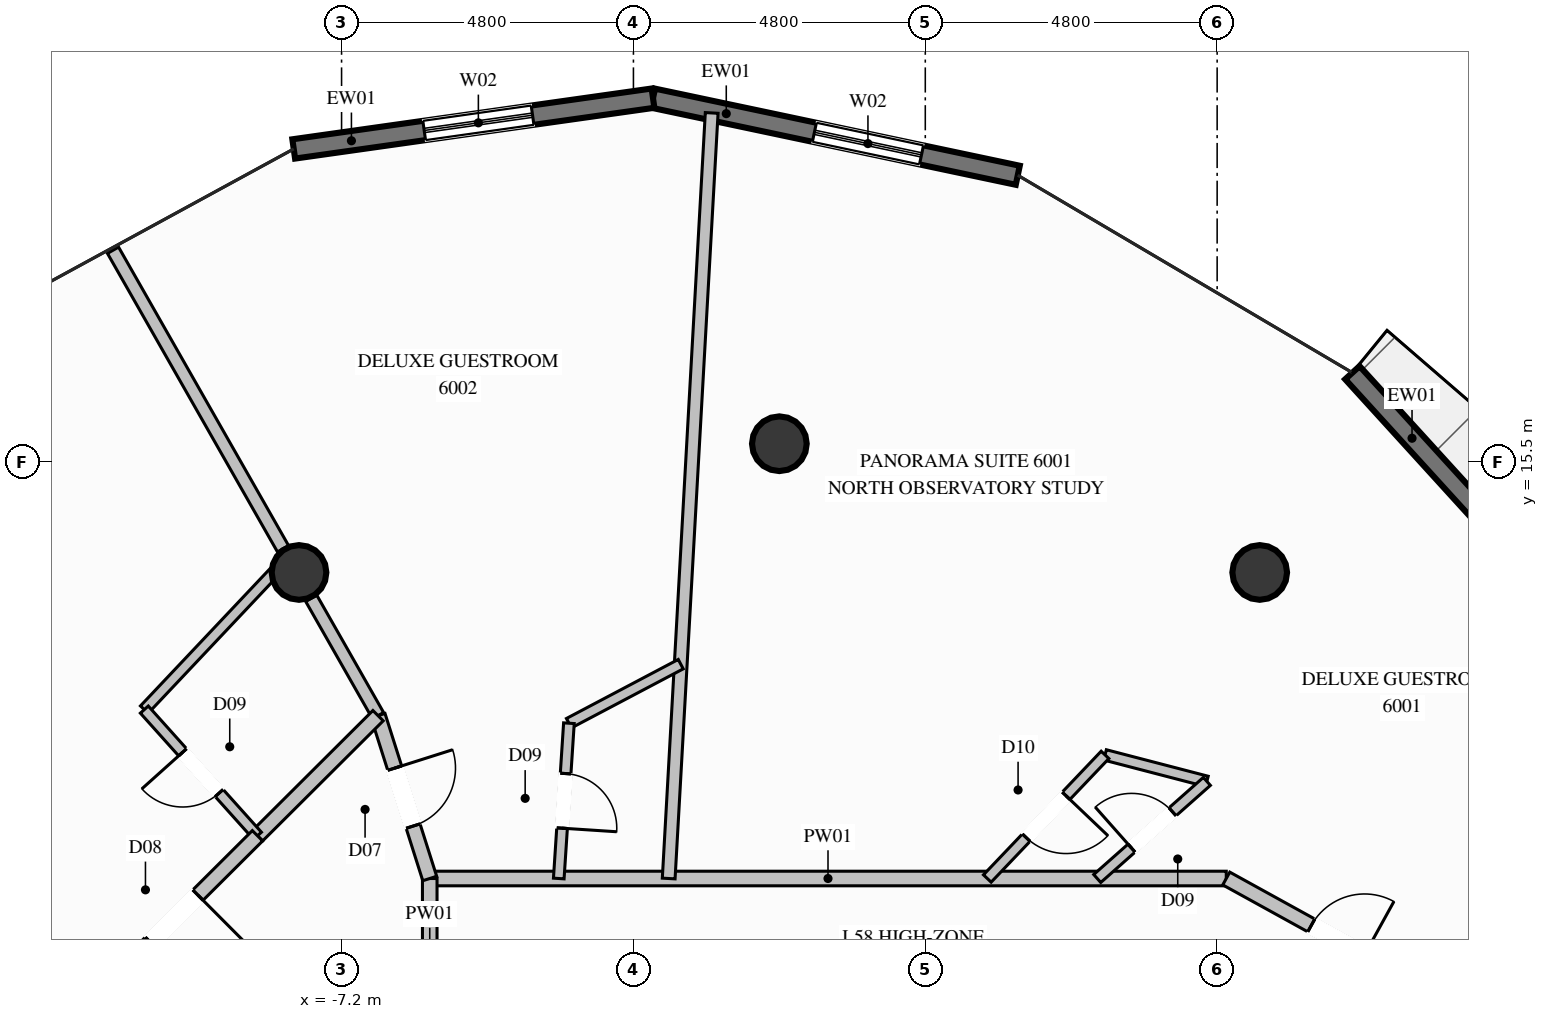
"""IFC4 building model, lengths in metres.
Left out: names, types, materials, properties, quantities, classifications, styles, units other than length and angle.
Written with IfcOpenShell. Run it as: python <this file> out.ifc"""

import sys

from ifc_helpers import new_model, si_unit, direction, frame, frame_2d, origin, origin_2d, place, context, subcontext, project, spatial, rectangle, circle, extrude, element, fill, save


model = new_model("IFC4")
c1 = context("Model", 3, precision=1e-05, world=origin(), true_north=direction((0.0, 1.0)))
c2 = subcontext(c1, "Body", "Model", "MODEL_VIEW")
j1 = project(units=[si_unit("LENGTHUNIT", "METRE"), si_unit("PLANEANGLEUNIT", "RADIAN")], contexts=[c1])
p1 = place(None, origin())
s1 = spatial("IfcSite", under=j1, at=p1, CompositionType="ELEMENT")
p2 = place(p1, origin())
s2 = spatial("IfcBuilding", under=s1, at=p2, CompositionType="ELEMENT")
p3 = place(p2, frame((0.0, 0.0, 223.6)))
s3 = spatial("IfcBuildingStorey", under=s2, at=p3, CompositionType="ELEMENT", Elevation=223.6)
for number, where, z_axis, x_axis in (
    (1, (7.9, 13.683, 0.0), (0.0, 0.0, 1.0), (1.0, 0.0, 0.0)),
    (2, (0.0, 15.8, 0.0), (0.0, 0.0, 1.0), (1.0, 0.0, 0.0)),
    (3, (-7.9, 13.683, 0.0), (0.0, 0.0, 1.0), (1.0, 0.0, 0.0)),
):
    element("IfcColumn", number, at=place(p3, frame(where, z_axis=z_axis, x_axis=x_axis)), inside=s3, PredefinedType="COLUMN", context=c2, shape_type="SweptSolid", body=[
        extrude(circle(Radius=0.45, at=origin_2d()), origin(), (0.0, 0.0, 1.0), 3.6),
    ])
p4 = place(p3, frame((9.424, 16.968, 0.0), z_axis=(0.0, 0.0, 1.0), x_axis=(0.673187110457, -0.739472186302, 0.0)))
e4 = element("IfcWall", 4, at=p4, inside=s3, PredefinedType="SOLIDWALL", context=c2, shape_type="SweptSolid", body=[
    extrude(rectangle(XDim=6.637, YDim=0.32, at=frame_2d((3.319, 0.0))), origin(), (0.0, 0.0, 1.0), 3.36),
])
p5 = place(p4, frame((3.165, 0.0, 0.35)))
e5 = element("IfcOpeningElement", 5, at=p5, cuts=e4, PredefinedType="OPENING", context=c2, shape_type="SweptSolid", body=[
    extrude(rectangle(XDim=1.8, YDim=2.6, at=frame_2d((0.9, 1.3))), frame((0.0, 0.17, 0.0), z_axis=(0.0, -1.0, 0.0), x_axis=(1.0, 0.0, 0.0)), (0.0, 0.0, 1.0), 0.34),
])
p6 = place(p3, frame((-2.078, 21.483, 0.0), z_axis=(0.0, 0.0, 1.0), x_axis=(0.978387673067, -0.206779015353, 0.0)))
e6 = element("IfcWall", 6, at=p6, inside=s3, PredefinedType="SOLIDWALL", context=c2, shape_type="SweptSolid", body=[
    extrude(rectangle(XDim=6.131, YDim=0.32, at=frame_2d((3.066, 0.0))), origin(), (0.0, 0.0, 1.0), 3.36),
])
p7 = place(p6, frame((2.713, 0.0, 0.35)))
e7 = element("IfcOpeningElement", 7, at=p7, cuts=e6, PredefinedType="OPENING", context=c2, shape_type="SweptSolid", body=[
    extrude(rectangle(XDim=1.8, YDim=2.6, at=frame_2d((0.9, 1.3))), frame((0.0, 0.17, 0.0), z_axis=(0.0, -1.0, 0.0), x_axis=(1.0, 0.0, 0.0)), (0.0, 0.0, 1.0), 0.34),
])
p8 = place(p3, frame((-7.987, 20.648, 0.0), z_axis=(0.0, 0.0, 1.0), x_axis=(0.990164339135, 0.13990919021, 0.0)))
e8 = element("IfcWall", 8, at=p8, inside=s3, PredefinedType="SOLIDWALL", context=c2, shape_type="SweptSolid", body=[
    extrude(rectangle(XDim=5.968, YDim=0.32, at=frame_2d((2.984, 0.0))), origin(), (0.0, 0.0, 1.0), 3.36),
])
p9 = place(p8, frame((2.167, 0.0, 0.35)))
e9 = element("IfcOpeningElement", 9, at=p9, cuts=e8, PredefinedType="OPENING", context=c2, shape_type="SweptSolid", body=[
    extrude(rectangle(XDim=1.8, YDim=2.6, at=frame_2d((0.9, 1.3))), frame((0.0, 0.17, 0.0), z_axis=(0.0, -1.0, 0.0), x_axis=(1.0, 0.0, 0.0)), (0.0, 0.0, 1.0), 0.34),
])
p10 = place(p3, frame((-5.75, 8.65, 0.0), z_axis=(0.0, 0.0, 1.0), x_axis=(1.0, 0.0, 0.0)))
e10 = element("IfcWall", 10, at=p10, inside=s3, PredefinedType="PARTITIONING", context=c2, shape_type="SweptSolid", body=[
    extrude(rectangle(XDim=13.1, YDim=0.24, at=frame_2d((6.55, 0.0))), origin(), (0.0, 0.0, 1.0), 3.36),
])
p11 = place(p3, frame((-5.75, 6.1, 0.0), z_axis=(0.0, 0.0, 1.0), x_axis=(0.0, 1.0, 0.0)))
e11 = element("IfcWall", 11, at=p11, inside=s3, PredefinedType="PARTITIONING", context=c2, shape_type="SweptSolid", body=[
    extrude(rectangle(XDim=2.55, YDim=0.24, at=frame_2d((1.275, 0.0))), origin(), (0.0, 0.0, 1.0), 3.36),
])
p12 = place(p3, frame((11.022, 6.625, 0.0), z_axis=(0.0, 0.0, 1.0), x_axis=(0.88806021567, 0.459727150975, 0.0)))
e12 = element("IfcWall", 12, at=p12, inside=s3, PredefinedType="PARTITIONING", context=c2, shape_type="SweptSolid", body=[
    extrude(rectangle(XDim=2.489, YDim=0.21, at=frame_2d((1.244, 0.0))), origin(), (0.0, 0.0, 1.0), 2.801),
])
p13 = place(p3, frame((-6.6, 11.328, 0.0), z_axis=(0.0, 0.0, 1.0), x_axis=(-0.494753305644, 0.869033466878, 0.0)))
e13 = element("IfcWall", 13, at=p13, inside=s3, PredefinedType="PARTITIONING", context=c2, shape_type="SweptSolid", body=[
    extrude(rectangle(XDim=2.221, YDim=0.21, at=frame_2d((1.11, 0.0))), origin(), (0.0, 0.0, 1.0), 2.801),
])
p14 = place(p3, frame((-8.163, 14.073, 0.0), z_axis=(0.0, 0.0, 1.0), x_axis=(-0.494909777101, 0.868944366763, 0.0)))
e14 = element("IfcWall", 14, at=p14, inside=s3, PredefinedType="PARTITIONING", context=c2, shape_type="SweptSolid", body=[
    extrude(rectangle(XDim=5.649, YDim=0.21, at=frame_2d((2.825, 0.0))), origin(), (0.0, 0.0, 1.0), 3.36),
])
p15 = place(p3, frame((5.356, 10.683, 0.0), z_axis=(0.0, 0.0, 1.0), x_axis=(0.967748954233, -0.25191657663, 0.0)))
e15 = element("IfcWall", 15, at=p15, inside=s3, PredefinedType="PLUMBINGWALL", context=c2, shape_type="SweptSolid", body=[
    extrude(rectangle(XDim=1.731, YDim=0.175, at=frame_2d((0.865, 0.0))), origin(), (0.0, 0.0, 1.0), 3.36),
])
p16 = place(p3, frame((5.356, 10.683, 0.0), z_axis=(0.0, 0.0, 1.0), x_axis=(-0.689590027436, -0.724199968283, 0.0)))
e16 = element("IfcWall", 16, at=p16, inside=s3, PredefinedType="PLUMBINGWALL", context=c2, shape_type="SweptSolid", body=[
    extrude(rectangle(XDim=2.808, YDim=0.175, at=frame_2d((1.404, 0.0))), origin(), (0.0, 0.0, 1.0), 3.36),
])
p17 = place(p16, frame((0.929, 0.0, 0.0)))
e17 = element("IfcOpeningElement", 17, at=p17, cuts=e16, PredefinedType="OPENING", context=c2, shape_type="SweptSolid", body=[
    extrude(rectangle(XDim=0.95, YDim=2.1, at=frame_2d((0.475, 1.05))), frame((0.0, 0.098, 0.0), z_axis=(0.0, -1.0, 0.0), x_axis=(1.0, 0.0, 0.0)), (0.0, 0.0, 1.0), 0.195),
])
p18 = place(p3, frame((5.228, 8.65, 0.0), z_axis=(0.0, 0.0, 1.0), x_axis=(0.748537869346, 0.663092043502, 0.0)))
e18 = element("IfcWall", 18, at=p18, inside=s3, PredefinedType="PLUMBINGWALL", context=c2, shape_type="SweptSolid", body=[
    extrude(rectangle(XDim=2.409, YDim=0.175, at=frame_2d((1.204, 0.0))), origin(), (0.0, 0.0, 1.0), 3.36),
])
p19 = place(p18, frame((0.754, 0.0, 0.0)))
e19 = element("IfcOpeningElement", 19, at=p19, cuts=e18, PredefinedType="OPENING", context=c2, shape_type="SweptSolid", body=[
    extrude(rectangle(XDim=0.9, YDim=2.1, at=frame_2d((0.45, 1.05))), frame((0.0, 0.098, 0.0), z_axis=(0.0, -1.0, 0.0), x_axis=(1.0, 0.0, 0.0)), (0.0, 0.0, 1.0), 0.195),
])
p20 = place(p3, frame((7.35, 8.65, 0.0), z_axis=(0.0, 0.0, 1.0), x_axis=(0.875674474849, -0.482901867979, 0.0)))
e20 = element("IfcWall", 20, at=p20, inside=s3, PredefinedType="PARTITIONING", context=c2, shape_type="SweptSolid", body=[
    extrude(rectangle(XDim=4.193, YDim=0.24, at=frame_2d((2.097, 0.0))), origin(), (0.0, 0.0, 1.0), 3.36),
])
p21 = place(p20, frame((1.597, 0.0, 0.0)))
e21 = element("IfcOpeningElement", 21, at=p21, cuts=e20, PredefinedType="OPENING", context=c2, shape_type="SweptSolid", body=[
    extrude(rectangle(XDim=1.0, YDim=2.2, at=frame_2d((0.5, 1.1))), frame((0.0, 0.13, 0.0), z_axis=(0.0, -1.0, 0.0), x_axis=(1.0, 0.0, 0.0)), (0.0, 0.0, 1.0), 0.26),
])
p22 = place(p3, frame((-1.82, 8.65, 0.0), z_axis=(0.0, 0.0, 1.0), x_axis=(0.056069425864, 0.998426872376, 0.0)))
e22 = element("IfcWall", 22, at=p22, inside=s3, PredefinedType="PARTITIONING", context=c2, shape_type="SweptSolid", body=[
    extrude(rectangle(XDim=12.61, YDim=0.21, at=frame_2d((6.305, 0.0))), origin(), (0.0, 0.0, 1.0), 3.36),
])
p23 = place(p3, frame((-3.461, 11.204, 0.0), z_axis=(0.0, 0.0, 1.0), x_axis=(0.884298578972, 0.466921859874, 0.0)))
e23 = element("IfcWall", 23, at=p23, inside=s3, PredefinedType="PLUMBINGWALL", context=c2, shape_type="SweptSolid", body=[
    extrude(rectangle(XDim=2.079, YDim=0.175, at=frame_2d((1.04, 0.0))), origin(), (0.0, 0.0, 1.0), 3.36),
])
p24 = place(p3, frame((-3.461, 11.204, 0.0), z_axis=(0.0, 0.0, 1.0), x_axis=(-0.065240183473, -0.997869589907, 0.0)))
e24 = element("IfcWall", 24, at=p24, inside=s3, PredefinedType="PLUMBINGWALL", context=c2, shape_type="SweptSolid", body=[
    extrude(rectangle(XDim=2.56, YDim=0.175, at=frame_2d((1.28, 0.0))), origin(), (0.0, 0.0, 1.0), 3.36),
])
p25 = place(p24, frame((0.83, 0.0, 0.0)))
e25 = element("IfcOpeningElement", 25, at=p25, cuts=e24, PredefinedType="OPENING", context=c2, shape_type="SweptSolid", body=[
    extrude(rectangle(XDim=0.9, YDim=2.1, at=frame_2d((0.45, 1.05))), frame((0.0, 0.098, 0.0), z_axis=(0.0, -1.0, 0.0), x_axis=(1.0, 0.0, 0.0)), (0.0, 0.0, 1.0), 0.195),
])
p26 = place(p3, frame((-6.6, 11.328, 0.0), z_axis=(0.0, 0.0, 1.0), x_axis=(0.30256159068, -0.953129835775, 0.0)))
e26 = element("IfcWall", 26, at=p26, inside=s3, PredefinedType="PARTITIONING", context=c2, shape_type="SweptSolid", body=[
    extrude(rectangle(XDim=2.81, YDim=0.24, at=frame_2d((1.405, 0.0))), origin(), (0.0, 0.0, 1.0), 3.36),
])
p27 = place(p26, frame((0.905, 0.0, 0.0)))
e27 = element("IfcOpeningElement", 27, at=p27, cuts=e26, PredefinedType="OPENING", context=c2, shape_type="SweptSolid", body=[
    extrude(rectangle(XDim=1.0, YDim=2.2, at=frame_2d((0.5, 1.1))), frame((0.0, 0.13, 0.0), z_axis=(0.0, -1.0, 0.0), x_axis=(1.0, 0.0, 0.0)), (0.0, 0.0, 1.0), 0.26),
])
p28 = place(p3, frame((-6.6, 11.328, 0.0), z_axis=(0.0, 0.0, 1.0), x_axis=(-0.708544738437, -0.705665893772, 0.0)))
e28 = element("IfcWall", 28, at=p28, inside=s3, PredefinedType="PARTITIONING", context=c2, shape_type="SweptSolid", body=[
    extrude(rectangle(XDim=2.799, YDim=0.24, at=frame_2d((1.399, 0.0))), origin(), (0.0, 0.0, 1.0), 3.36),
])
p29 = place(p3, frame((-8.082, 13.93, 0.0), z_axis=(0.0, 0.0, 1.0), x_axis=(-0.686486009921, -0.727143010819, 0.0)))
e29 = element("IfcWall", 29, at=p29, inside=s3, PredefinedType="PLUMBINGWALL", context=c2, shape_type="SweptSolid", body=[
    extrude(rectangle(XDim=3.441, YDim=0.175, at=frame_2d((1.72, 0.0))), origin(), (0.0, 0.0, 1.0), 2.929),
])
p30 = place(p3, frame((-8.583, 9.353, 0.0), z_axis=(0.0, 0.0, 1.0), x_axis=(-0.667700723626, 0.74442981111, 0.0)))
e30 = element("IfcWall", 30, at=p30, inside=s3, PredefinedType="PLUMBINGWALL", context=c2, shape_type="SweptSolid", body=[
    extrude(rectangle(XDim=2.787, YDim=0.175, at=frame_2d((1.394, 0.0))), origin(), (0.0, 0.0, 1.0), 3.36),
])
p31 = place(p30, frame((0.944, 0.0, 0.0)))
e31 = element("IfcOpeningElement", 31, at=p31, cuts=e30, PredefinedType="OPENING", context=c2, shape_type="SweptSolid", body=[
    extrude(rectangle(XDim=0.9, YDim=2.1, at=frame_2d((0.45, 1.05))), frame((0.0, 0.098, 0.0), z_axis=(0.0, -1.0, 0.0), x_axis=(1.0, 0.0, 0.0)), (0.0, 0.0, 1.0), 0.195),
])
p32 = place(p3, frame((-8.583, 9.353, 0.0), z_axis=(0.0, 0.0, 1.0), x_axis=(-0.70852632163, -0.70568438523, 0.0)))
e32 = element("IfcWall", 32, at=p32, inside=s3, PredefinedType="PARTITIONING", context=c2, shape_type="SweptSolid", body=[
    extrude(rectangle(XDim=3.866, YDim=0.24, at=frame_2d((1.933, 0.0))), origin(), (0.0, 0.0, 1.0), 3.36),
])
p33 = place(p32, frame((1.383, 0.0, 0.0)))
e33 = element("IfcOpeningElement", 33, at=p33, cuts=e32, PredefinedType="OPENING", context=c2, shape_type="SweptSolid", body=[
    extrude(rectangle(XDim=1.1, YDim=2.3, at=frame_2d((0.55, 1.15))), frame((0.0, 0.13, 0.0), z_axis=(0.0, -1.0, 0.0), x_axis=(1.0, 0.0, 0.0)), (0.0, 0.0, 1.0), 0.26),
])
p34 = place(p7, origin())
e34 = element("IfcWindow", 34, at=p34, inside=s3, PartitioningType="SINGLE_PANEL", PredefinedType="WINDOW", context=c2, shape_type="SweptSolid", body=[
    extrude(rectangle(XDim=1.8, YDim=2.6, at=frame_2d((0.9, 1.3))), frame((0.0, 0.03, 0.0), z_axis=(0.0, -1.0, 0.0), x_axis=(1.0, 0.0, 0.0)), (0.0, 0.0, 1.0), 0.06),
])
fill(e7, e34)
p35 = place(p9, origin())
e35 = element("IfcWindow", 35, at=p35, inside=s3, PartitioningType="SINGLE_PANEL", PredefinedType="WINDOW", context=c2, shape_type="SweptSolid", body=[
    extrude(rectangle(XDim=1.8, YDim=2.6, at=frame_2d((0.9, 1.3))), frame((0.0, 0.03, 0.0), z_axis=(0.0, -1.0, 0.0), x_axis=(1.0, 0.0, 0.0)), (0.0, 0.0, 1.0), 0.06),
])
fill(e9, e35)
p36 = place(p19, origin())
e36 = element("IfcDoor", 36, at=p36, inside=s3, OperationType="SINGLE_SWING_LEFT", PredefinedType="DOOR", context=c2, shape_type="SweptSolid", body=[
    extrude(rectangle(XDim=0.9, YDim=2.1, at=frame_2d((0.45, 1.05))), frame((0.0, 0.025, 0.0), z_axis=(0.0, -1.0, 0.0), x_axis=(1.0, 0.0, 0.0)), (0.0, 0.0, 1.0), 0.05),
])
fill(e19, e36)
p37 = place(p21, origin())
e37 = element("IfcDoor", 37, at=p37, inside=s3, OperationType="SINGLE_SWING_RIGHT", PredefinedType="DOOR", context=c2, shape_type="SweptSolid", body=[
    extrude(rectangle(XDim=1.0, YDim=2.2, at=frame_2d((0.5, 1.1))), frame((0.0, 0.025, 0.0), z_axis=(0.0, -1.0, 0.0), x_axis=(1.0, 0.0, 0.0)), (0.0, 0.0, 1.0), 0.05),
])
fill(e21, e37)
p38 = place(p17, origin())
e38 = element("IfcDoor", 38, at=p38, inside=s3, OperationType="SINGLE_SWING_LEFT", PredefinedType="DOOR", context=c2, shape_type="SweptSolid", body=[
    extrude(rectangle(XDim=0.95, YDim=2.1, at=frame_2d((0.475, 1.05))), frame((0.0, 0.025, 0.0), z_axis=(0.0, -1.0, 0.0), x_axis=(1.0, 0.0, 0.0)), (0.0, 0.0, 1.0), 0.05),
])
fill(e17, e38)
p39 = place(p25, origin())
e39 = element("IfcDoor", 39, at=p39, inside=s3, OperationType="SINGLE_SWING_RIGHT", PredefinedType="DOOR", context=c2, shape_type="SweptSolid", body=[
    extrude(rectangle(XDim=0.9, YDim=2.1, at=frame_2d((0.45, 1.05))), frame((0.0, 0.025, 0.0), z_axis=(0.0, -1.0, 0.0), x_axis=(1.0, 0.0, 0.0)), (0.0, 0.0, 1.0), 0.05),
])
fill(e25, e39)
p40 = place(p27, origin())
e40 = element("IfcDoor", 40, at=p40, inside=s3, OperationType="SINGLE_SWING_LEFT", PredefinedType="DOOR", context=c2, shape_type="SweptSolid", body=[
    extrude(rectangle(XDim=1.0, YDim=2.2, at=frame_2d((0.5, 1.1))), frame((0.0, 0.025, 0.0), z_axis=(0.0, -1.0, 0.0), x_axis=(1.0, 0.0, 0.0)), (0.0, 0.0, 1.0), 0.05),
])
fill(e27, e40)
p41 = place(p31, origin())
e41 = element("IfcDoor", 41, at=p41, inside=s3, OperationType="SINGLE_SWING_RIGHT", PredefinedType="DOOR", context=c2, shape_type="SweptSolid", body=[
    extrude(rectangle(XDim=0.9, YDim=2.1, at=frame_2d((0.45, 1.05))), frame((0.0, 0.025, 0.0), z_axis=(0.0, -1.0, 0.0), x_axis=(1.0, 0.0, 0.0)), (0.0, 0.0, 1.0), 0.05),
])
fill(e31, e41)
p42 = place(p33, origin())
e42 = element("IfcDoor", 42, at=p42, inside=s3, OperationType="SINGLE_SWING_LEFT", PredefinedType="DOOR", context=c2, shape_type="SweptSolid", body=[
    extrude(rectangle(XDim=1.1, YDim=2.3, at=frame_2d((0.55, 1.15))), frame((0.0, 0.025, 0.0), z_axis=(0.0, -1.0, 0.0), x_axis=(1.0, 0.0, 0.0)), (0.0, 0.0, 1.0), 0.05),
])
fill(e33, e42)
save(model, sys.argv[1])
